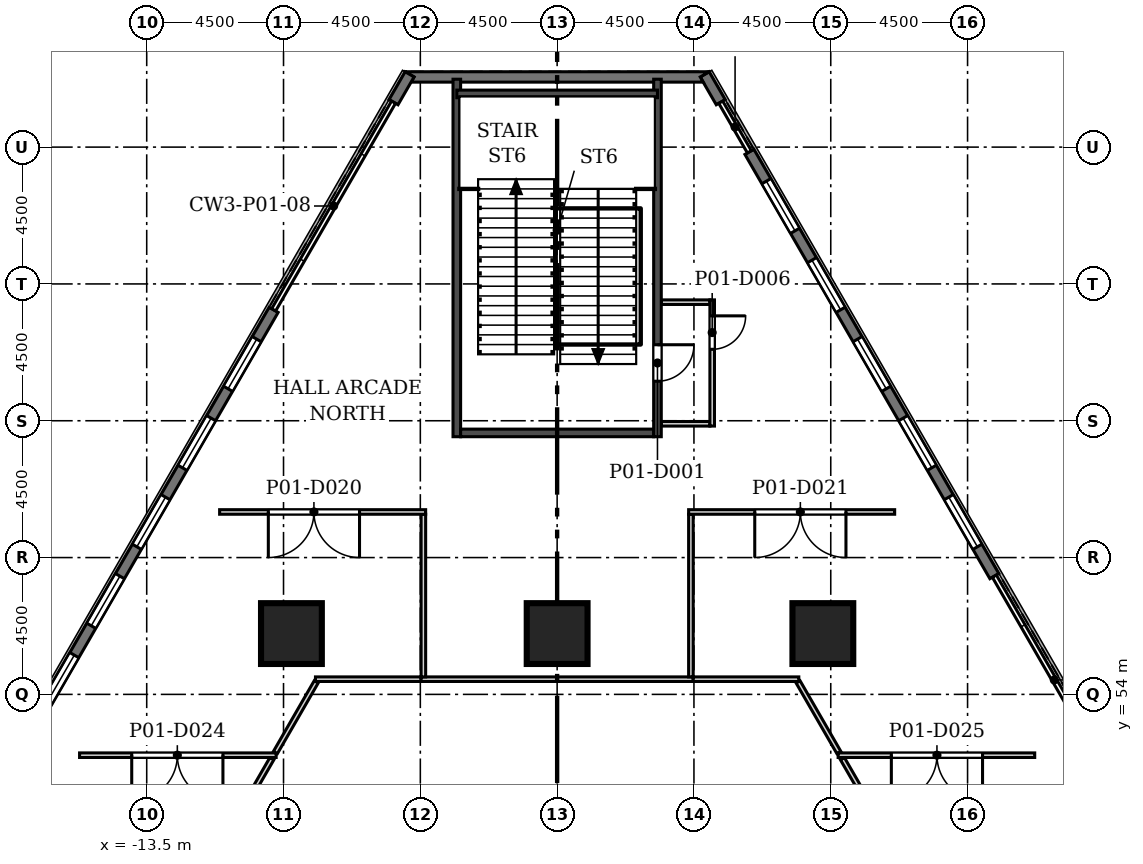
"""IFC4 building model, lengths in metres.
Left out: names, types, materials, properties, quantities, classifications, styles, units other than length and angle.
Written with IfcOpenShell. Run it as: python <this file> out.ifc"""

import sys

from ifc_helpers import new_model, si_unit, direction, frame, frame_2d, origin, origin_2d, place, context, subcontext, project, spatial, polyline, rectangle, outline, extrude, element, fill, save


model = new_model("IFC4")
c1 = context("Model", 3, precision=1e-05, world=origin(), true_north=direction((0.0, 1.0)))
c2 = subcontext(c1, "Body", "Model", "MODEL_VIEW")
j1 = project(units=[si_unit("LENGTHUNIT", "METRE"), si_unit("PLANEANGLEUNIT", "RADIAN")], contexts=[c1])
p1 = place(None, origin())
s1 = spatial("IfcSite", under=j1, at=p1, CompositionType="ELEMENT")
p2 = place(p1, origin())
s2 = spatial("IfcBuilding", under=s1, at=p2, CompositionType="ELEMENT")
p3 = place(p2, frame((0.0, 0.0, 8.0)))
s3 = spatial("IfcBuildingStorey", under=s2, at=p3, CompositionType="ELEMENT", Elevation=8.0)
for number, where, z_axis, x_axis in (
    (1, (-8.74, 56.0, 0.0), (0.0, 0.0, 1.0), (1.0, 0.0, 0.0)),
    (2, (8.74, 56.0, 0.0), (0.0, 0.0, 1.0), (1.0, 0.0, 0.0)),
    (3, (0.0, 56.0, 0.0), (0.0, 0.0, 1.0), (1.0, 0.0, 0.0)),
):
    element("IfcColumn", number, at=place(p3, frame(where, z_axis=z_axis, x_axis=x_axis)), inside=s3, PredefinedType="COLUMN", context=c2, shape_type="SweptSolid", body=[
        extrude(rectangle(XDim=2.0, YDim=2.0, at=origin_2d()), origin(), (0.0, 0.0, 1.0), 6.0),
    ])
p4 = place(p3, frame((14.382, 57.889, 0.0), z_axis=(0.0, 0.0, 1.0), x_axis=(-0.500003967864, 0.866023112925, 0.0)))
e4 = element("IfcWall", 4, at=p4, inside=s3, PredefinedType="SOLIDWALL", context=c2, shape_type="SweptSolid", body=[
    extrude(rectangle(XDim=16.115, YDim=0.34, at=frame_2d((8.058, 0.0))), origin(), (0.0, 0.0, 1.0), 5.7),
])
p5 = place(p4, frame((1.115, 0.0, 0.9)))
e5 = element("IfcOpeningElement", 5, at=p5, cuts=e4, PredefinedType="OPENING", context=c2, shape_type="SweptSolid", body=[
    extrude(rectangle(XDim=1.885, YDim=3.5, at=frame_2d((0.942, 1.75))), frame((0.0, 0.18, 0.0), z_axis=(0.0, -1.0, 0.0), x_axis=(1.0, 0.0, 0.0)), (0.0, 0.0, 1.0), 0.36),
])
p6 = place(p4, frame((4.115, 0.0, 0.9)))
e6 = element("IfcOpeningElement", 6, at=p6, cuts=e4, PredefinedType="OPENING", context=c2, shape_type="SweptSolid", body=[
    extrude(rectangle(XDim=1.885, YDim=3.5, at=frame_2d((0.942, 1.75))), frame((0.0, 0.18, 0.0), z_axis=(0.0, -1.0, 0.0), x_axis=(1.0, 0.0, 0.0)), (0.0, 0.0, 1.0), 0.36),
])
p7 = place(p4, frame((7.115, 0.0, 0.9)))
e7 = element("IfcOpeningElement", 7, at=p7, cuts=e4, PredefinedType="OPENING", context=c2, shape_type="SweptSolid", body=[
    extrude(rectangle(XDim=1.885, YDim=3.5, at=frame_2d((0.942, 1.75))), frame((0.0, 0.18, 0.0), z_axis=(0.0, -1.0, 0.0), x_axis=(1.0, 0.0, 0.0)), (0.0, 0.0, 1.0), 0.36),
])
p8 = place(p4, frame((10.115, 0.0, 0.9)))
e8 = element("IfcOpeningElement", 8, at=p8, cuts=e4, PredefinedType="OPENING", context=c2, shape_type="SweptSolid", body=[
    extrude(rectangle(XDim=1.885, YDim=3.5, at=frame_2d((0.942, 1.75))), frame((0.0, 0.18, 0.0), z_axis=(0.0, -1.0, 0.0), x_axis=(1.0, 0.0, 0.0)), (0.0, 0.0, 1.0), 0.36),
])
p9 = place(p4, frame((13.115, 0.0, 0.9)))
e9 = element("IfcOpeningElement", 9, at=p9, cuts=e4, PredefinedType="OPENING", context=c2, shape_type="SweptSolid", body=[
    extrude(rectangle(XDim=1.885, YDim=3.5, at=frame_2d((0.942, 1.75))), frame((0.0, 0.18, 0.0), z_axis=(0.0, -1.0, 0.0), x_axis=(1.0, 0.0, 0.0)), (0.0, 0.0, 1.0), 0.36),
])
p10 = place(p3, frame((5.382, 73.477, 0.0), z_axis=(0.0, 0.0, 1.0), x_axis=(-0.499962223639, 0.866047212878, 0.0)))
e10 = element("IfcWall", 10, at=p10, inside=s3, PredefinedType="SOLIDWALL", context=c2, shape_type="SweptSolid", body=[
    extrude(rectangle(XDim=1.058, YDim=0.34, at=frame_2d((0.529, 0.0))), origin(), (0.0, 0.0, 1.0), 5.7),
])
p11 = place(p3, origin())
e11 = element("IfcWall", 11, at=p11, inside=s3, PredefinedType="SOLIDWALL", context=c2, shape_type="SweptSolid", body=[
    extrude(outline(polyline([(5.001, 74.478), (4.706, 74.308), (4.805, 74.138), (-4.805, 74.138), (-4.706, 74.308), (-5.001, 74.478), (-5.001, 74.479), (5.001, 74.479), (5.001, 74.478)])), origin(), (0.0, 0.0, 1.0), 5.7),
])
p12 = place(p3, frame((-4.853, 74.393, 0.0), z_axis=(0.0, 0.0, 1.0), x_axis=(-0.499962223639, -0.866047212878, 0.0)))
e12 = element("IfcWall", 12, at=p12, inside=s3, PredefinedType="SOLIDWALL", context=c2, shape_type="SweptSolid", body=[
    extrude(rectangle(XDim=1.058, YDim=0.34, at=frame_2d((0.529, 0.0))), origin(), (0.0, 0.0, 1.0), 5.7),
])
p13 = place(p3, frame((-9.324, 66.649, 0.0), z_axis=(0.0, 0.0, 1.0), x_axis=(-0.500010528026, -0.866019325341, 0.0)))
e13 = element("IfcWall", 13, at=p13, inside=s3, PredefinedType="SOLIDWALL", context=c2, shape_type="SweptSolid", body=[
    extrude(rectangle(XDim=16.115, YDim=0.34, at=frame_2d((8.058, 0.0))), origin(), (0.0, 0.0, 1.0), 5.7),
])
p14 = place(p13, frame((1.115, 0.0, 0.9)))
e14 = element("IfcOpeningElement", 14, at=p14, cuts=e13, PredefinedType="OPENING", context=c2, shape_type="SweptSolid", body=[
    extrude(rectangle(XDim=1.885, YDim=3.5, at=frame_2d((0.942, 1.75))), frame((0.0, 0.18, 0.0), z_axis=(0.0, -1.0, 0.0), x_axis=(1.0, 0.0, 0.0)), (0.0, 0.0, 1.0), 0.36),
])
p15 = place(p13, frame((4.115, 0.0, 0.9)))
e15 = element("IfcOpeningElement", 15, at=p15, cuts=e13, PredefinedType="OPENING", context=c2, shape_type="SweptSolid", body=[
    extrude(rectangle(XDim=1.885, YDim=3.5, at=frame_2d((0.942, 1.75))), frame((0.0, 0.18, 0.0), z_axis=(0.0, -1.0, 0.0), x_axis=(1.0, 0.0, 0.0)), (0.0, 0.0, 1.0), 0.36),
])
p16 = place(p13, frame((7.115, 0.0, 0.9)))
e16 = element("IfcOpeningElement", 16, at=p16, cuts=e13, PredefinedType="OPENING", context=c2, shape_type="SweptSolid", body=[
    extrude(rectangle(XDim=1.885, YDim=3.5, at=frame_2d((0.942, 1.75))), frame((0.0, 0.18, 0.0), z_axis=(0.0, -1.0, 0.0), x_axis=(1.0, 0.0, 0.0)), (0.0, 0.0, 1.0), 0.36),
])
p17 = place(p13, frame((10.115, 0.0, 0.9)))
e17 = element("IfcOpeningElement", 17, at=p17, cuts=e13, PredefinedType="OPENING", context=c2, shape_type="SweptSolid", body=[
    extrude(rectangle(XDim=1.885, YDim=3.5, at=frame_2d((0.942, 1.75))), frame((0.0, 0.18, 0.0), z_axis=(0.0, -1.0, 0.0), x_axis=(1.0, 0.0, 0.0)), (0.0, 0.0, 1.0), 0.36),
])
p18 = place(p13, frame((13.115, 0.0, 0.9)))
e18 = element("IfcOpeningElement", 18, at=p18, cuts=e13, PredefinedType="OPENING", context=c2, shape_type="SweptSolid", body=[
    extrude(rectangle(XDim=1.885, YDim=3.5, at=frame_2d((0.942, 1.75))), frame((0.0, 0.18, 0.0), z_axis=(0.0, -1.0, 0.0), x_axis=(1.0, 0.0, 0.0)), (0.0, 0.0, 1.0), 0.36),
])
p19 = place(p3, frame((-13.885, 44.088, 0.0), z_axis=(0.0, 0.0, 1.0), x_axis=(0.499987617168, 0.866032552898, 0.0)))
e19 = element("IfcWall", 19, at=p19, inside=s3, PredefinedType="PARTITIONING", context=c2, shape_type="SweptSolid", body=[
    extrude(rectangle(XDim=9.006, YDim=0.15, at=frame_2d((4.503, 0.0))), origin(), (0.0, 0.0, 1.0), 5.7),
])
p20 = place(p19, frame((4.68, 0.0, 0.0)))
e20 = element("IfcOpeningElement", 20, at=p20, cuts=e19, PredefinedType="OPENING", context=c2, shape_type="SweptSolid", body=[
    extrude(rectangle(XDim=3.0, YDim=2.4, at=frame_2d((1.5, 1.2))), frame((0.0, 0.085, 0.0), z_axis=(0.0, -1.0, 0.0), x_axis=(1.0, 0.0, 0.0)), (0.0, 0.0, 1.0), 0.17),
])
p21 = place(p3, frame((9.383, 51.887, 0.0), z_axis=(0.0, 0.0, 1.0), x_axis=(0.499987617168, -0.866032552898, 0.0)))
e21 = element("IfcWall", 21, at=p21, inside=s3, PredefinedType="PARTITIONING", context=c2, shape_type="SweptSolid", body=[
    extrude(rectangle(XDim=9.006, YDim=0.15, at=frame_2d((4.503, 0.0))), origin(), (0.0, 0.0, 1.0), 5.7),
])
p22 = place(p21, frame((1.326, 0.0, 0.0)))
e22 = element("IfcOpeningElement", 22, at=p22, cuts=e21, PredefinedType="OPENING", context=c2, shape_type="SweptSolid", body=[
    extrude(rectangle(XDim=3.0, YDim=2.4, at=frame_2d((1.5, 1.2))), frame((0.0, 0.085, 0.0), z_axis=(0.0, -1.0, 0.0), x_axis=(1.0, 0.0, 0.0)), (0.0, 0.0, 1.0), 0.17),
])
p23 = place(p3, frame((-15.709, 52.0, 0.0), z_axis=(0.0, 0.0, 1.0), x_axis=(1.0, 0.0, 0.0)))
e23 = element("IfcWall", 23, at=p23, inside=s3, PredefinedType="PARTITIONING", context=c2, shape_type="SweptSolid", body=[
    extrude(rectangle(XDim=6.466, YDim=0.15, at=frame_2d((3.233, 0.0))), origin(), (0.0, 0.0, 1.0), 5.7),
])
p24 = place(p23, frame((1.716, 0.0, 0.0)))
e24 = element("IfcOpeningElement", 24, at=p24, cuts=e23, PredefinedType="OPENING", context=c2, shape_type="SweptSolid", body=[
    extrude(rectangle(XDim=3.0, YDim=2.4, at=frame_2d((1.5, 1.2))), frame((0.0, 0.085, 0.0), z_axis=(0.0, -1.0, 0.0), x_axis=(1.0, 0.0, 0.0)), (0.0, 0.0, 1.0), 0.17),
])
p25 = place(p3, frame((9.242, 52.0, 0.0), z_axis=(0.0, 0.0, 1.0), x_axis=(1.0, 0.0, 0.0)))
e25 = element("IfcWall", 25, at=p25, inside=s3, PredefinedType="PARTITIONING", context=c2, shape_type="SweptSolid", body=[
    extrude(rectangle(XDim=6.466, YDim=0.15, at=frame_2d((3.233, 0.0))), origin(), (0.0, 0.0, 1.0), 5.7),
])
p26 = place(p25, frame((1.75, 0.0, 0.0)))
e26 = element("IfcOpeningElement", 26, at=p26, cuts=e25, PredefinedType="OPENING", context=c2, shape_type="SweptSolid", body=[
    extrude(rectangle(XDim=3.0, YDim=2.4, at=frame_2d((1.5, 1.2))), frame((0.0, 0.085, 0.0), z_axis=(0.0, -1.0, 0.0), x_axis=(1.0, 0.0, 0.0)), (0.0, 0.0, 1.0), 0.17),
])
for number, where, z_axis, x_axis in (
    (27, (-9.267, 52.088, 0.0), (0.0, 0.0, 1.0), (0.5, 0.866, 0.0)),
    (28, (7.925, 54.412, 0.0), (0.0, 0.0, 1.0), (0.5, -0.866, 0.0)),
):
    element("IfcWall", number, at=place(p3, frame(where, z_axis=z_axis, x_axis=x_axis)), inside=s3, PredefinedType="PARTITIONING", context=c2, shape_type="SweptSolid", body=[
        extrude(rectangle(XDim=2.684, YDim=0.15, at=frame_2d((1.342, 0.0))), origin(), (0.0, 0.0, 1.0), 5.7),
    ])
p27 = place(p3, frame((-7.949, 54.5, 0.0), z_axis=(0.0, 0.0, 1.0), x_axis=(1.0, 0.0, 0.0)))
e29 = element("IfcWall", 29, at=p27, inside=s3, PredefinedType="PARTITIONING", context=c2, shape_type="SweptSolid", body=[
    extrude(rectangle(XDim=3.474, YDim=0.15, at=frame_2d((1.737, 0.0))), origin(), (0.0, 0.0, 1.0), 5.7),
])
p28 = place(p3, frame((-4.475, 54.5, 0.0), z_axis=(0.0, 0.0, 1.0), x_axis=(1.0, 0.0, 0.0)))
e30 = element("IfcWall", 30, at=p28, inside=s3, PredefinedType="PARTITIONING", context=c2, shape_type="SweptSolid", body=[
    extrude(rectangle(XDim=8.95, YDim=0.15, at=frame_2d((4.475, 0.0))), origin(), (0.0, 0.0, 1.0), 5.7),
])
p29 = place(p3, frame((4.475, 54.5, 0.0), z_axis=(0.0, 0.0, 1.0), x_axis=(1.0, 0.0, 0.0)))
e31 = element("IfcWall", 31, at=p29, inside=s3, PredefinedType="PARTITIONING", context=c2, shape_type="SweptSolid", body=[
    extrude(rectangle(XDim=3.474, YDim=0.15, at=frame_2d((1.737, 0.0))), origin(), (0.0, 0.0, 1.0), 5.7),
])
for number, where, z_axis, x_axis in (
    (32, (4.4, 54.575, 0.0), (0.0, 0.0, 1.0), (0.0, 1.0, 0.0)),
    (33, (-4.4, 59.925, 0.0), (0.0, 0.0, 1.0), (0.0, -1.0, 0.0)),
):
    element("IfcWall", number, at=place(p3, frame(where, z_axis=z_axis, x_axis=x_axis)), inside=s3, PredefinedType="PARTITIONING", context=c2, shape_type="SweptSolid", body=[
        extrude(rectangle(XDim=5.35, YDim=0.15, at=frame_2d((2.675, 0.0))), origin(), (0.0, 0.0, 1.0), 5.7),
    ])
p30 = place(p3, frame((-11.102, 60.0, 0.0), z_axis=(0.0, 0.0, 1.0), x_axis=(1.0, 0.0, 0.0)))
e34 = element("IfcWall", 34, at=p30, inside=s3, PredefinedType="PARTITIONING", context=c2, shape_type="SweptSolid", body=[
    extrude(rectangle(XDim=6.777, YDim=0.15, at=frame_2d((3.389, 0.0))), origin(), (0.0, 0.0, 1.0), 5.7),
])
p31 = place(p30, frame((1.602, 0.0, 0.0)))
e35 = element("IfcOpeningElement", 35, at=p31, cuts=e34, PredefinedType="OPENING", context=c2, shape_type="SweptSolid", body=[
    extrude(rectangle(XDim=3.0, YDim=2.4, at=frame_2d((1.5, 1.2))), frame((0.0, 0.085, 0.0), z_axis=(0.0, -1.0, 0.0), x_axis=(1.0, 0.0, 0.0)), (0.0, 0.0, 1.0), 0.17),
])
p32 = place(p3, frame((4.325, 60.0, 0.0), z_axis=(0.0, 0.0, 1.0), x_axis=(1.0, 0.0, 0.0)))
e36 = element("IfcWall", 36, at=p32, inside=s3, PredefinedType="PARTITIONING", context=c2, shape_type="SweptSolid", body=[
    extrude(rectangle(XDim=6.777, YDim=0.15, at=frame_2d((3.389, 0.0))), origin(), (0.0, 0.0, 1.0), 5.7),
])
p33 = place(p32, frame((2.175, 0.0, 0.0)))
e37 = element("IfcOpeningElement", 37, at=p33, cuts=e36, PredefinedType="OPENING", context=c2, shape_type="SweptSolid", body=[
    extrude(rectangle(XDim=3.0, YDim=2.4, at=frame_2d((1.5, 1.2))), frame((0.0, 0.085, 0.0), z_axis=(0.0, -1.0, 0.0), x_axis=(1.0, 0.0, 0.0)), (0.0, 0.0, 1.0), 0.17),
])
p34 = place(p3, frame((-3.3, 62.475, 0.0), z_axis=(0.0, 0.0, 1.0), x_axis=(0.0, 1.0, 0.0)))
e38 = element("IfcWall", 38, at=p34, inside=s3, PredefinedType="SOLIDWALL", context=c2, shape_type="SweptSolid", body=[
    extrude(rectangle(XDim=11.758, YDim=0.25, at=frame_2d((5.879, 0.0))), origin(), (0.0, 0.0, 1.0), 5.7),
])
p35 = place(p3, frame((3.175, 62.6, 0.0), z_axis=(0.0, 0.0, 1.0), x_axis=(-1.0, 0.0, 0.0)))
e39 = element("IfcWall", 39, at=p35, inside=s3, PredefinedType="SOLIDWALL", context=c2, shape_type="SweptSolid", body=[
    extrude(rectangle(XDim=6.35, YDim=0.25, at=frame_2d((3.175, 0.0))), origin(), (0.0, 0.0, 1.0), 5.7),
])
for number, where, z_axis, x_axis in (
    (40, (5.025, 62.9, 0.0), (0.0, 0.0, 1.0), (-1.0, 0.0, 0.0)),
    (41, (3.425, 66.9, 0.0), (0.0, 0.0, 1.0), (1.0, 0.0, 0.0)),
):
    element("IfcWall", number, at=place(p3, frame(where, z_axis=z_axis, x_axis=x_axis)), inside=s3, PredefinedType="PARTITIONING", context=c2, shape_type="SweptSolid", body=[
        extrude(rectangle(XDim=1.6, YDim=0.15, at=frame_2d((0.8, 0.0))), origin(), (0.0, 0.0, 1.0), 5.7),
    ])
p36 = place(p3, frame((5.1, 66.975, 0.0), z_axis=(0.0, 0.0, 1.0), x_axis=(0.0, -1.0, 0.0)))
e42 = element("IfcWall", 42, at=p36, inside=s3, PredefinedType="PARTITIONING", context=c2, shape_type="SweptSolid", body=[
    extrude(rectangle(XDim=4.15, YDim=0.15, at=frame_2d((2.075, 0.0))), origin(), (0.0, 0.0, 1.0), 5.7),
])
p37 = place(p36, frame((0.525, 0.0, 0.0)))
e43 = element("IfcOpeningElement", 43, at=p37, cuts=e42, PredefinedType="OPENING", context=c2, shape_type="SweptSolid", body=[
    extrude(rectangle(XDim=1.1, YDim=2.1, at=frame_2d((0.55, 1.05))), frame((0.0, 0.085, 0.0), z_axis=(0.0, -1.0, 0.0), x_axis=(1.0, 0.0, 0.0)), (0.0, 0.0, 1.0), 0.17),
])
p38 = place(p3, frame((3.3, 74.233, 0.0), z_axis=(0.0, 0.0, 1.0), x_axis=(0.0, -1.0, 0.0)))
e44 = element("IfcWall", 44, at=p38, inside=s3, PredefinedType="SOLIDWALL", context=c2, shape_type="SweptSolid", body=[
    extrude(rectangle(XDim=11.758, YDim=0.25, at=frame_2d((5.879, 0.0))), origin(), (0.0, 0.0, 1.0), 5.7),
])
p39 = place(p38, frame((8.733, 0.0, 0.0)))
e45 = element("IfcOpeningElement", 45, at=p39, cuts=e44, PredefinedType="OPENING", context=c2, shape_type="SweptSolid", body=[
    extrude(rectangle(XDim=1.2, YDim=2.1, at=frame_2d((0.6, 1.05))), frame((0.0, 0.135, 0.0), z_axis=(0.0, -1.0, 0.0), x_axis=(1.0, 0.0, 0.0)), (0.0, 0.0, 1.0), 0.27),
])
p40 = place(p3, frame((-3.3, 73.75, 0.0), z_axis=(0.0, 0.0, 1.0), x_axis=(1.0, 0.0, 0.0)))
e46 = element("IfcWall", 46, at=p40, inside=s3, PredefinedType="SOLIDWALL", context=c2, shape_type="SweptSolid", body=[
    extrude(rectangle(XDim=6.6, YDim=0.25, at=frame_2d((3.3, 0.0))), origin(), (0.0, 0.0, 1.0), 5.7),
])
p41 = place(p5, origin())
e47 = element("IfcWindow", 47, at=p41, inside=s3, PartitioningType="SINGLE_PANEL", PredefinedType="WINDOW", context=c2, shape_type="SweptSolid", body=[
    extrude(rectangle(XDim=1.885, YDim=3.5, at=frame_2d((0.942, 1.75))), frame((0.0, 0.11, 0.0), z_axis=(0.0, -1.0, 0.0), x_axis=(1.0, 0.0, 0.0)), (0.0, 0.0, 1.0), 0.06),
])
fill(e5, e47)
p42 = place(p6, origin())
e48 = element("IfcWindow", 48, at=p42, inside=s3, PartitioningType="SINGLE_PANEL", PredefinedType="WINDOW", context=c2, shape_type="SweptSolid", body=[
    extrude(rectangle(XDim=1.885, YDim=3.5, at=frame_2d((0.942, 1.75))), frame((0.0, 0.11, 0.0), z_axis=(0.0, -1.0, 0.0), x_axis=(1.0, 0.0, 0.0)), (0.0, 0.0, 1.0), 0.06),
])
fill(e6, e48)
p43 = place(p7, origin())
e49 = element("IfcWindow", 49, at=p43, inside=s3, PartitioningType="SINGLE_PANEL", PredefinedType="WINDOW", context=c2, shape_type="SweptSolid", body=[
    extrude(rectangle(XDim=1.885, YDim=3.5, at=frame_2d((0.942, 1.75))), frame((0.0, 0.11, 0.0), z_axis=(0.0, -1.0, 0.0), x_axis=(1.0, 0.0, 0.0)), (0.0, 0.0, 1.0), 0.06),
])
fill(e7, e49)
p44 = place(p8, origin())
e50 = element("IfcWindow", 50, at=p44, inside=s3, PartitioningType="SINGLE_PANEL", PredefinedType="WINDOW", context=c2, shape_type="SweptSolid", body=[
    extrude(rectangle(XDim=1.885, YDim=3.5, at=frame_2d((0.942, 1.75))), frame((0.0, 0.11, 0.0), z_axis=(0.0, -1.0, 0.0), x_axis=(1.0, 0.0, 0.0)), (0.0, 0.0, 1.0), 0.06),
])
fill(e8, e50)
p45 = place(p9, origin())
e51 = element("IfcWindow", 51, at=p45, inside=s3, PartitioningType="SINGLE_PANEL", PredefinedType="WINDOW", context=c2, shape_type="SweptSolid", body=[
    extrude(rectangle(XDim=1.885, YDim=3.5, at=frame_2d((0.942, 1.75))), frame((0.0, 0.11, 0.0), z_axis=(0.0, -1.0, 0.0), x_axis=(1.0, 0.0, 0.0)), (0.0, 0.0, 1.0), 0.06),
])
fill(e9, e51)
p46 = place(p14, origin())
e52 = element("IfcWindow", 52, at=p46, inside=s3, PartitioningType="SINGLE_PANEL", PredefinedType="WINDOW", context=c2, shape_type="SweptSolid", body=[
    extrude(rectangle(XDim=1.885, YDim=3.5, at=frame_2d((0.942, 1.75))), frame((0.0, 0.11, 0.0), z_axis=(0.0, -1.0, 0.0), x_axis=(1.0, 0.0, 0.0)), (0.0, 0.0, 1.0), 0.06),
])
fill(e14, e52)
p47 = place(p15, origin())
e53 = element("IfcWindow", 53, at=p47, inside=s3, PartitioningType="SINGLE_PANEL", PredefinedType="WINDOW", context=c2, shape_type="SweptSolid", body=[
    extrude(rectangle(XDim=1.885, YDim=3.5, at=frame_2d((0.942, 1.75))), frame((0.0, 0.11, 0.0), z_axis=(0.0, -1.0, 0.0), x_axis=(1.0, 0.0, 0.0)), (0.0, 0.0, 1.0), 0.06),
])
fill(e15, e53)
p48 = place(p16, origin())
e54 = element("IfcWindow", 54, at=p48, inside=s3, PartitioningType="SINGLE_PANEL", PredefinedType="WINDOW", context=c2, shape_type="SweptSolid", body=[
    extrude(rectangle(XDim=1.885, YDim=3.5, at=frame_2d((0.942, 1.75))), frame((0.0, 0.11, 0.0), z_axis=(0.0, -1.0, 0.0), x_axis=(1.0, 0.0, 0.0)), (0.0, 0.0, 1.0), 0.06),
])
fill(e16, e54)
p49 = place(p17, origin())
e55 = element("IfcWindow", 55, at=p49, inside=s3, PartitioningType="SINGLE_PANEL", PredefinedType="WINDOW", context=c2, shape_type="SweptSolid", body=[
    extrude(rectangle(XDim=1.885, YDim=3.5, at=frame_2d((0.942, 1.75))), frame((0.0, 0.11, 0.0), z_axis=(0.0, -1.0, 0.0), x_axis=(1.0, 0.0, 0.0)), (0.0, 0.0, 1.0), 0.06),
])
fill(e17, e55)
p50 = place(p18, origin())
e56 = element("IfcWindow", 56, at=p50, inside=s3, PartitioningType="SINGLE_PANEL", PredefinedType="WINDOW", context=c2, shape_type="SweptSolid", body=[
    extrude(rectangle(XDim=1.885, YDim=3.5, at=frame_2d((0.942, 1.75))), frame((0.0, 0.11, 0.0), z_axis=(0.0, -1.0, 0.0), x_axis=(1.0, 0.0, 0.0)), (0.0, 0.0, 1.0), 0.06),
])
fill(e18, e56)
p51 = place(p39, origin())
e57 = element("IfcDoor", 57, at=p51, inside=s3, OperationType="SINGLE_SWING_LEFT", PredefinedType="DOOR", context=c2, shape_type="SweptSolid", body=[
    extrude(rectangle(XDim=1.2, YDim=2.1, at=frame_2d((0.6, 1.05))), frame((0.0, 0.025, 0.0), z_axis=(0.0, -1.0, 0.0), x_axis=(1.0, 0.0, 0.0)), (0.0, 0.0, 1.0), 0.05),
])
fill(e45, e57)
p52 = place(p37, origin())
e58 = element("IfcDoor", 58, at=p52, inside=s3, OperationType="SINGLE_SWING_LEFT", PredefinedType="DOOR", context=c2, shape_type="SweptSolid", body=[
    extrude(rectangle(XDim=1.1, YDim=2.1, at=frame_2d((0.55, 1.05))), frame((0.0, 0.025, 0.0), z_axis=(0.0, -1.0, 0.0), x_axis=(1.0, 0.0, 0.0)), (0.0, 0.0, 1.0), 0.05),
])
fill(e43, e58)
p53 = place(p31, frame((3.0, 0.0, 0.0), z_axis=(0.0, 0.0, 1.0), x_axis=(-1.0, 0.0, 0.0)))
e59 = element("IfcDoor", 59, at=p53, inside=s3, OperationType="DOUBLE_DOOR_SINGLE_SWING", PredefinedType="DOOR", context=c2, shape_type="SweptSolid", body=[
    extrude(rectangle(XDim=3.0, YDim=2.4, at=frame_2d((1.5, 1.2))), frame((0.0, 0.025, 0.0), z_axis=(0.0, -1.0, 0.0), x_axis=(1.0, 0.0, 0.0)), (0.0, 0.0, 1.0), 0.05),
])
fill(e35, e59)
p54 = place(p33, frame((3.0, 0.0, 0.0), z_axis=(0.0, 0.0, 1.0), x_axis=(-1.0, 0.0, 0.0)))
e60 = element("IfcDoor", 60, at=p54, inside=s3, OperationType="DOUBLE_DOOR_SINGLE_SWING", PredefinedType="DOOR", context=c2, shape_type="SweptSolid", body=[
    extrude(rectangle(XDim=3.0, YDim=2.4, at=frame_2d((1.5, 1.2))), frame((0.0, 0.025, 0.0), z_axis=(0.0, -1.0, 0.0), x_axis=(1.0, 0.0, 0.0)), (0.0, 0.0, 1.0), 0.05),
])
fill(e37, e60)
p55 = place(p24, frame((3.0, 0.0, 0.0), z_axis=(0.0, 0.0, 1.0), x_axis=(-1.0, 0.0, 0.0)))
e61 = element("IfcDoor", 61, at=p55, inside=s3, OperationType="DOUBLE_DOOR_SINGLE_SWING", PredefinedType="DOOR", context=c2, shape_type="SweptSolid", body=[
    extrude(rectangle(XDim=3.0, YDim=2.4, at=frame_2d((1.5, 1.2))), frame((0.0, 0.025, 0.0), z_axis=(0.0, -1.0, 0.0), x_axis=(1.0, 0.0, 0.0)), (0.0, 0.0, 1.0), 0.05),
])
fill(e24, e61)
p56 = place(p26, frame((3.0, 0.0, 0.0), z_axis=(0.0, 0.0, 1.0), x_axis=(-1.0, 0.0, 0.0)))
e62 = element("IfcDoor", 62, at=p56, inside=s3, OperationType="DOUBLE_DOOR_SINGLE_SWING", PredefinedType="DOOR", context=c2, shape_type="SweptSolid", body=[
    extrude(rectangle(XDim=3.0, YDim=2.4, at=frame_2d((1.5, 1.2))), frame((0.0, 0.025, 0.0), z_axis=(0.0, -1.0, 0.0), x_axis=(1.0, 0.0, 0.0)), (0.0, 0.0, 1.0), 0.05),
])
fill(e26, e62)
save(model, sys.argv[1])
